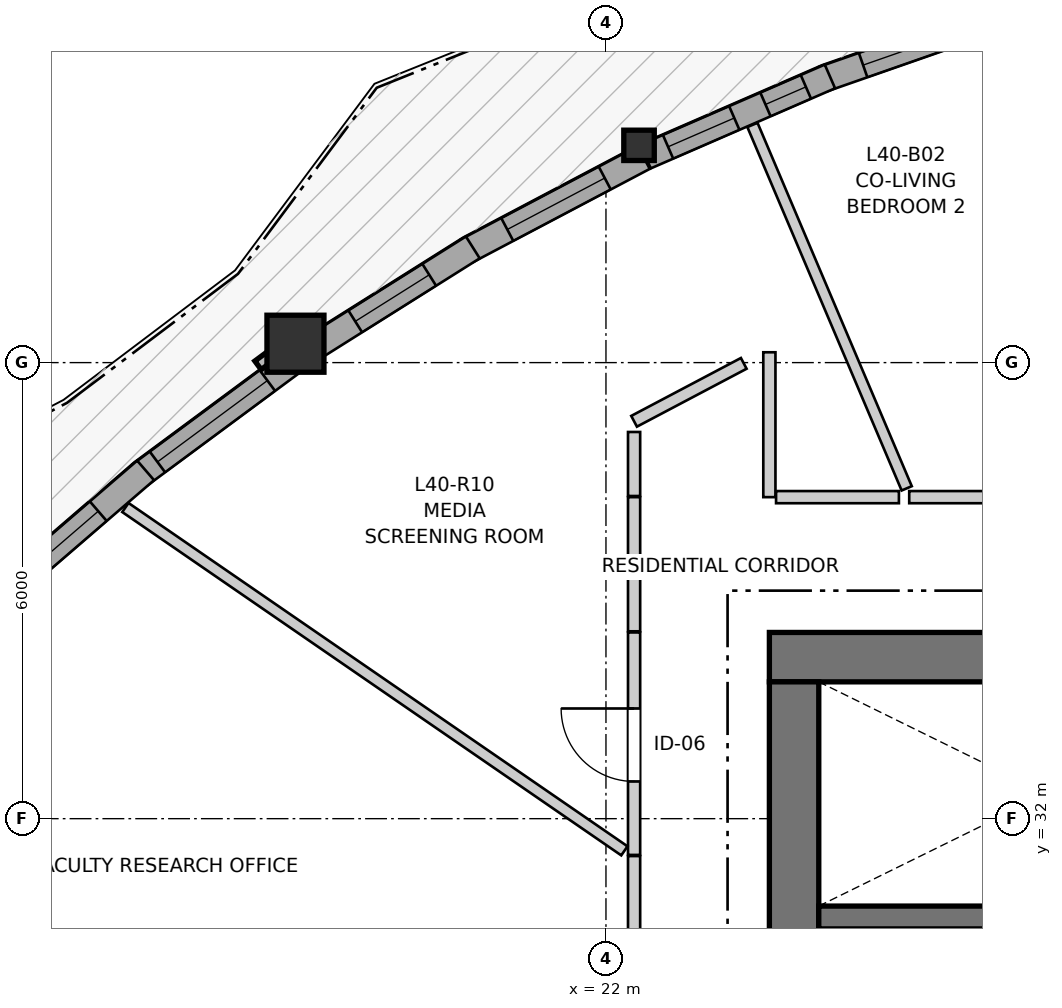
"""IFC4 building model, lengths in metres.
Left out: names, types, materials, properties, quantities, classifications, styles, units other than length and angle.
Written with IfcOpenShell. Run it as: python <this file> out.ifc"""

import sys

from ifc_helpers import new_model, si_unit, direction, frame, frame_2d, origin, origin_2d, place, context, subcontext, project, spatial, rectangle, i_section, extrude, source, transform, mapped, element, fill, save


model = new_model("IFC4")
c1 = context("Model", 3, precision=1e-05, world=origin(), true_north=direction((0.0, 1.0)))
c2 = subcontext(c1, "Body", "Model", "MODEL_VIEW")
j1 = project(units=[si_unit("LENGTHUNIT", "METRE"), si_unit("PLANEANGLEUNIT", "RADIAN")], contexts=[c1])
p1 = place(None, origin())
s1 = spatial("IfcSite", under=j1, at=p1, CompositionType="ELEMENT")
p2 = place(p1, origin())
s2 = spatial("IfcBuilding", under=s1, at=p2, CompositionType="ELEMENT")
p3 = place(p2, frame((0.0, 0.0, 136.2)))
s3 = spatial("IfcBuildingStorey", under=s2, at=p3, CompositionType="ELEMENT", Elevation=136.2)
p4 = place(p3, frame((36.55, 34.125, 0.0), z_axis=(0.0, 0.0, 1.0), x_axis=(-1.0, 0.0, 0.0)))
e1 = element("IfcWall", 1, at=p4, inside=s3, PredefinedType="SHEAR", context=c2, shape_type="SweptSolid", body=[
    extrude(rectangle(XDim=12.4, YDim=0.65, at=frame_2d((6.2, 0.0))), origin(), (0.0, 0.0, 1.0), 2.95),
])
p5 = place(p3, frame((24.475, 33.8, 0.0), z_axis=(0.0, 0.0, 1.0), x_axis=(0.0, -1.0, 0.0)))
e2 = element("IfcWall", 2, at=p5, inside=s3, PredefinedType="SHEAR", context=c2, shape_type="SweptSolid", body=[
    extrude(rectangle(XDim=15.6, YDim=0.65, at=frame_2d((7.8, 0.0))), origin(), (0.0, 0.0, 1.0), 2.95),
])
p6 = place(p5, frame((7.05, 0.0, 0.0)))
e3 = element("IfcOpeningElement", 3, at=p6, cuts=e2, PredefinedType="OPENING", context=c2, shape_type="SweptSolid", body=[
    extrude(rectangle(XDim=1.5, YDim=2.15, at=frame_2d((0.75, 1.075))), frame((0.0, 0.335, 0.0), z_axis=(0.0, -1.0, 0.0), x_axis=(1.0, 0.0, 0.0)), (0.0, 0.0, 1.0), 0.67),
])
p7 = place(p5, frame((3.52, 0.0, 0.0)))
e4 = element("IfcOpeningElement", 4, at=p7, cuts=e2, PredefinedType="OPENING", context=c2, shape_type="SweptSolid", body=[
    extrude(rectangle(XDim=0.86, YDim=2.05, at=frame_2d((0.43, 1.025))), frame((0.0, 0.335, 0.0), z_axis=(0.0, -1.0, 0.0), x_axis=(1.0, 0.0, 0.0)), (0.0, 0.0, 1.0), 0.67),
])
p8 = place(p5, frame((11.22, 0.0, 0.0)))
e5 = element("IfcOpeningElement", 5, at=p8, cuts=e2, PredefinedType="OPENING", context=c2, shape_type="SweptSolid", body=[
    extrude(rectangle(XDim=0.86, YDim=2.05, at=frame_2d((0.43, 1.025))), frame((0.0, 0.335, 0.0), z_axis=(0.0, -1.0, 0.0), x_axis=(1.0, 0.0, 0.0)), (0.0, 0.0, 1.0), 0.67),
])
p9 = place(p3, frame((24.8, 30.7, 0.0), z_axis=(0.0, 0.0, 1.0), x_axis=(1.0, 0.0, 0.0)))
e6 = element("IfcWall", 6, at=p9, inside=s3, PredefinedType="SHEAR", context=c2, shape_type="SweptSolid", body=[
    extrude(rectangle(XDim=11.1, YDim=0.3, at=frame_2d((5.55, 0.0))), origin(), (0.0, 0.0, 1.0), 2.95),
])
p10 = place(p9, frame((6.22, 0.0, 0.0)))
e7 = element("IfcOpeningElement", 7, at=p10, cuts=e6, PredefinedType="OPENING", context=c2, shape_type="SweptSolid", body=[
    extrude(rectangle(XDim=0.98, YDim=2.15, at=frame_2d((0.49, 1.075))), frame((0.0, 0.16, 0.0), z_axis=(0.0, -1.0, 0.0), x_axis=(1.0, 0.0, 0.0)), (0.0, 0.0, 1.0), 0.32),
])
p11 = place(p9, frame((9.15, 0.0, 0.0)))
e8 = element("IfcOpeningElement", 8, at=p11, cuts=e6, PredefinedType="OPENING", context=c2, shape_type="SweptSolid", body=[
    extrude(rectangle(XDim=1.15, YDim=2.15, at=frame_2d((0.575, 1.075))), frame((0.0, 0.16, 0.0), z_axis=(0.0, -1.0, 0.0), x_axis=(1.0, 0.0, 0.0)), (0.0, 0.0, 1.0), 0.32),
])
m1 = source(origin(), c2, "Body", "SweptSolid", [
    extrude(i_section(OverallWidth=0.401, OverallDepth=0.399, WebThickness=0.023, FlangeThickness=0.036, FilletRadius=0.015, at=origin_2d()), origin(), (0.0, 0.0, 1.0), 2.95),
])
p12 = place(p3, frame((22.435, 40.858, 0.0), z_axis=(0.0, 0.0, 1.0), x_axis=(1.0, 0.0, 0.0)))
e9 = element("IfcColumn", 9, at=p12, inside=s3, PredefinedType="PILASTER", context=c2, shape_type="MappedRepresentation", body=[
    mapped(m1, transform((0.0, 0.0, 0.0), x_axis=(1.0, 0.0, 0.0), y_axis=(0.0, 1.0, 0.0), z_axis=(0.0, 0.0, 1.0), scale=1.0)),
])
m2 = source(origin(), c2, "Body", "SweptSolid", [
    extrude(rectangle(XDim=0.75, YDim=0.75, at=origin_2d()), origin(), (0.0, 0.0, 1.0), 2.95),
])
p13 = place(p3, frame((17.915, 38.249, 0.0), z_axis=(0.0, 0.0, 1.0), x_axis=(1.0, 0.0, 0.0)))
e10 = element("IfcColumn", 10, at=p13, inside=s3, PredefinedType="COLUMN", context=c2, shape_type="MappedRepresentation", body=[
    mapped(m2, transform((0.0, 0.0, 0.0), x_axis=(1.0, 0.0, 0.0), y_axis=(0.0, 1.0, 0.0), z_axis=(0.0, 0.0, 1.0), scale=1.0)),
])
p14 = place(p3, frame((27.262, 42.57, 0.0), z_axis=(0.0, 0.0, 1.0), x_axis=(-0.944148723561, -0.329519631884, 0.0)))
e11 = element("IfcWall", 11, at=p14, inside=s3, PredefinedType="SOLIDWALL", context=c2, shape_type="SweptSolid", body=[
    extrude(rectangle(XDim=2.54, YDim=0.34, at=frame_2d((1.27, 0.0))), origin(), (0.0, 0.0, 1.0), 2.53),
])
p15 = place(p14, frame((0.54, 0.0, 0.82)))
e12 = element("IfcOpeningElement", 12, at=p15, cuts=e11, PredefinedType="OPENING", context=c2, shape_type="SweptSolid", body=[
    extrude(rectangle(XDim=1.45, YDim=1.25, at=frame_2d((0.725, 0.625))), frame((0.0, 0.18, 0.0), z_axis=(0.0, -1.0, 0.0), x_axis=(1.0, 0.0, 0.0)), (0.0, 0.0, 1.0), 0.36),
])
p16 = place(p3, frame((24.947, 41.765, 0.0), z_axis=(0.0, 0.0, 1.0), x_axis=(-0.917074459221, -0.398715984435, 0.0)))
e13 = element("IfcWall", 13, at=p16, inside=s3, PredefinedType="SOLIDWALL", context=c2, shape_type="SweptSolid", body=[
    extrude(rectangle(XDim=2.645, YDim=0.34, at=frame_2d((1.322, 0.0))), origin(), (0.0, 0.0, 1.0), 2.53),
])
p17 = place(p16, frame((0.344, 0.0, 0.82)))
e14 = element("IfcOpeningElement", 14, at=p17, cuts=e13, PredefinedType="OPENING", context=c2, shape_type="SweptSolid", body=[
    extrude(rectangle(XDim=0.58, YDim=1.35, at=frame_2d((0.29, 0.675))), frame((0.0, 0.18, 0.0), z_axis=(0.0, -1.0, 0.0), x_axis=(1.0, 0.0, 0.0)), (0.0, 0.0, 1.0), 0.36),
])
p18 = place(p16, frame((1.372, 0.0, 0.82)))
e15 = element("IfcOpeningElement", 15, at=p18, cuts=e13, PredefinedType="OPENING", context=c2, shape_type="SweptSolid", body=[
    extrude(rectangle(XDim=0.95, YDim=1.35, at=frame_2d((0.475, 0.675))), frame((0.0, 0.18, 0.0), z_axis=(0.0, -1.0, 0.0), x_axis=(1.0, 0.0, 0.0)), (0.0, 0.0, 1.0), 0.36),
])
p19 = place(p3, frame((22.497, 40.699, 0.0), z_axis=(0.0, 0.0, 1.0), x_axis=(-0.88439007496, -0.466748535415, 0.0)))
e16 = element("IfcWall", 16, at=p19, inside=s3, PredefinedType="SOLIDWALL", context=c2, shape_type="SweptSolid", body=[
    extrude(rectangle(XDim=2.63, YDim=0.34, at=frame_2d((1.315, 0.0))), origin(), (0.0, 0.0, 1.0), 2.53),
])
p20 = place(p19, frame((0.58, 0.0, 0.82)))
e17 = element("IfcOpeningElement", 17, at=p20, cuts=e16, PredefinedType="OPENING", context=c2, shape_type="SweptSolid", body=[
    extrude(rectangle(XDim=1.45, YDim=1.25, at=frame_2d((0.725, 0.625))), frame((0.0, 0.18, 0.0), z_axis=(0.0, -1.0, 0.0), x_axis=(1.0, 0.0, 0.0)), (0.0, 0.0, 1.0), 0.36),
])
p21 = place(p3, frame((20.248, 39.516, 0.0), z_axis=(0.0, 0.0, 1.0), x_axis=(-0.846438698205, -0.532486178394, 0.0)))
e18 = element("IfcWall", 18, at=p21, inside=s3, PredefinedType="SOLIDWALL", context=c2, shape_type="SweptSolid", body=[
    extrude(rectangle(XDim=2.495, YDim=0.34, at=frame_2d((1.247, 0.0))), origin(), (0.0, 0.0, 1.0), 2.53),
])
p22 = place(p21, frame((0.677, 0.0, 0.82)))
e19 = element("IfcOpeningElement", 19, at=p22, cuts=e18, PredefinedType="OPENING", context=c2, shape_type="SweptSolid", body=[
    extrude(rectangle(XDim=1.15, YDim=1.2, at=frame_2d((0.575, 0.6))), frame((0.0, 0.18, 0.0), z_axis=(0.0, -1.0, 0.0), x_axis=(1.0, 0.0, 0.0)), (0.0, 0.0, 1.0), 0.36),
])
p23 = place(p3, frame((17.891, 38.02, 0.0), z_axis=(0.0, 0.0, 1.0), x_axis=(-0.803824223013, -0.594866891411, 0.0)))
e20 = element("IfcWall", 20, at=p23, inside=s3, PredefinedType="SOLIDWALL", context=c2, shape_type="SweptSolid", body=[
    extrude(rectangle(XDim=2.51, YDim=0.34, at=frame_2d((1.255, 0.0))), origin(), (0.0, 0.0, 1.0), 2.53),
])
p24 = place(p23, frame((0.43, 0.0, 0.82)))
e21 = element("IfcOpeningElement", 21, at=p24, cuts=e20, PredefinedType="OPENING", context=c2, shape_type="SweptSolid", body=[
    extrude(rectangle(XDim=1.8, YDim=1.45, at=frame_2d((0.9, 0.725))), frame((0.0, 0.18, 0.0), z_axis=(0.0, -1.0, 0.0), x_axis=(1.0, 0.0, 0.0)), (0.0, 0.0, 1.0), 0.36),
])
p25 = place(p3, frame((15.943, 36.582, 0.0), z_axis=(0.0, 0.0, 1.0), x_axis=(-0.757520482063, -0.652811396389, 0.0)))
e22 = element("IfcWall", 22, at=p25, inside=s3, PredefinedType="SOLIDWALL", context=c2, shape_type="SweptSolid", body=[
    extrude(rectangle(XDim=2.674, YDim=0.34, at=frame_2d((1.337, 0.0))), origin(), (0.0, 0.0, 1.0), 2.53),
])
p26 = place(p25, frame((0.822, 0.0, 0.82)))
e23 = element("IfcOpeningElement", 23, at=p26, cuts=e22, PredefinedType="OPENING", context=c2, shape_type="SweptSolid", body=[
    extrude(rectangle(XDim=1.5, YDim=1.45, at=frame_2d((0.75, 0.725))), frame((0.0, 0.18, 0.0), z_axis=(0.0, -1.0, 0.0), x_axis=(1.0, 0.0, 0.0)), (0.0, 0.0, 1.0), 0.36),
])
p27 = place(p3, frame((25.99, 36.23, 0.0), z_axis=(0.0, 0.0, 1.0), x_axis=(1.0, 0.0, 0.0)))
e24 = element("IfcWall", 24, at=p27, inside=s3, PredefinedType="PARTITIONING", context=c2, shape_type="SweptSolid", body=[
    extrude(rectangle(XDim=4.073, YDim=0.16, at=frame_2d((2.037, 0.0))), origin(), (0.0, 0.0, 1.0), 2.95),
])
p28 = place(p27, frame((1.6, 0.0, 0.0)))
e25 = element("IfcOpeningElement", 25, at=p28, cuts=e24, PredefinedType="OPENING", context=c2, shape_type="SweptSolid", body=[
    extrude(rectangle(XDim=0.92, YDim=2.1, at=frame_2d((0.46, 1.05))), frame((0.0, 0.09, 0.0), z_axis=(0.0, -1.0, 0.0), x_axis=(1.0, 0.0, 0.0)), (0.0, 0.0, 1.0), 0.18),
])
p29 = place(p3, frame((22.37, 27.85, 0.0), z_axis=(0.0, 0.0, 1.0), x_axis=(0.0, 1.0, 0.0)))
e26 = element("IfcWall", 26, at=p29, inside=s3, PredefinedType="PARTITIONING", context=c2, shape_type="SweptSolid", body=[
    extrude(rectangle(XDim=3.658, YDim=0.16, at=frame_2d((1.829, 0.0))), origin(), (0.0, 0.0, 1.0), 2.95),
])
p30 = place(p29, frame((1.369, 0.0, 0.0)))
e27 = element("IfcOpeningElement", 27, at=p30, cuts=e26, PredefinedType="OPENING", context=c2, shape_type="SweptSolid", body=[
    extrude(rectangle(XDim=0.96, YDim=2.1, at=frame_2d((0.48, 1.05))), frame((0.0, 0.09, 0.0), z_axis=(0.0, -1.0, 0.0), x_axis=(1.0, 0.0, 0.0)), (0.0, 0.0, 1.0), 0.18),
])
p31 = place(p3, frame((22.37, 31.523, 0.0), z_axis=(0.0, 0.0, 1.0), x_axis=(0.0, 1.0, 0.0)))
e28 = element("IfcWall", 28, at=p31, inside=s3, PredefinedType="PARTITIONING", context=c2, shape_type="SweptSolid", body=[
    extrude(rectangle(XDim=2.927, YDim=0.16, at=frame_2d((1.463, 0.0))), origin(), (0.0, 0.0, 1.0), 2.95),
])
p32 = place(p31, frame((0.967, 0.0, 0.0)))
e29 = element("IfcOpeningElement", 29, at=p32, cuts=e28, PredefinedType="OPENING", context=c2, shape_type="SweptSolid", body=[
    extrude(rectangle(XDim=0.96, YDim=2.1, at=frame_2d((0.48, 1.05))), frame((0.0, 0.09, 0.0), z_axis=(0.0, -1.0, 0.0), x_axis=(1.0, 0.0, 0.0)), (0.0, 0.0, 1.0), 0.18),
])
p33 = place(p3, frame((15.677, 36.094, 0.0), z_axis=(0.0, 0.0, 1.0), x_axis=(0.823863992983, -0.566787544911, 0.0)))
e30 = element("IfcWall", 30, at=p33, inside=s3, PredefinedType="PARTITIONING", context=c2, shape_type="SweptSolid", body=[
    extrude(rectangle(XDim=7.969, YDim=0.145, at=frame_2d((3.984, 0.0))), origin(), (0.0, 0.0, 1.0), 2.95),
])
p34 = place(p3, frame((23.927, 41.127, 0.0), z_axis=(0.0, 0.0, 1.0), x_axis=(0.39073452171, -0.920503413108, 0.0)))
e31 = element("IfcWall", 31, at=p34, inside=s3, PredefinedType="PARTITIONING", context=c2, shape_type="SweptSolid", body=[
    extrude(rectangle(XDim=5.194, YDim=0.145, at=frame_2d((2.597, 0.0))), origin(), (0.0, 0.0, 1.0), 2.95),
])
p35 = place(p3, frame((24.15, 36.23, 0.0), z_axis=(0.0, 0.0, 1.0), x_axis=(0.0, 1.0, 0.0)))
e32 = element("IfcWall", 32, at=p35, inside=s3, PredefinedType="PARTITIONING", context=c2, shape_type="SweptSolid", body=[
    extrude(rectangle(XDim=1.906, YDim=0.16, at=frame_2d((0.953, 0.0))), origin(), (0.0, 0.0, 1.0), 2.95),
])
p36 = place(p3, frame((24.238, 36.23, 0.0), z_axis=(0.0, 0.0, 1.0), x_axis=(1.0, 0.0, 0.0)))
e33 = element("IfcWall", 33, at=p36, inside=s3, PredefinedType="PARTITIONING", context=c2, shape_type="SweptSolid", body=[
    extrude(rectangle(XDim=1.616, YDim=0.16, at=frame_2d((0.808, 0.0))), origin(), (0.0, 0.0, 1.0), 2.95),
])
p37 = place(p3, frame((22.37, 34.465, 0.0), z_axis=(0.0, 0.0, 1.0), x_axis=(0.0, 1.0, 0.0)))
e34 = element("IfcWall", 34, at=p37, inside=s3, PredefinedType="PARTITIONING", context=c2, shape_type="SweptSolid", body=[
    extrude(rectangle(XDim=1.765, YDim=0.16, at=frame_2d((0.882, 0.0))), origin(), (0.0, 0.0, 1.0), 2.95),
])
p38 = place(p3, frame((22.37, 37.228, 0.0), z_axis=(0.0, 0.0, 1.0), x_axis=(0.884271493782, 0.466973152638, 0.0)))
e35 = element("IfcWall", 35, at=p38, inside=s3, PredefinedType="PARTITIONING", context=c2, shape_type="SweptSolid", body=[
    extrude(rectangle(XDim=1.632, YDim=0.16, at=frame_2d((0.816, 0.0))), origin(), (0.0, 0.0, 1.0), 2.558),
])
p39 = place(p3, frame((22.37, 36.245, 0.0), z_axis=(0.0, 0.0, 1.0), x_axis=(0.0, 1.0, 0.0)))
e36 = element("IfcWall", 36, at=p39, inside=s3, PredefinedType="PARTITIONING", context=c2, shape_type="SweptSolid", body=[
    extrude(rectangle(XDim=0.842, YDim=0.16, at=frame_2d((0.421, 0.0))), origin(), (0.0, 0.0, 1.0), 2.95),
])
m3 = source(origin(), c2, "Body", "SweptSolid", [
    extrude(rectangle(XDim=1.45, YDim=1.25, at=frame_2d((0.725, 0.625))), frame((0.0, 0.03, 0.0), z_axis=(0.0, -1.0, 0.0), x_axis=(1.0, 0.0, 0.0)), (0.0, 0.0, 1.0), 0.06),
])
p40 = place(p15, origin())
e37 = element("IfcWindow", 37, at=p40, inside=s3, PartitioningType="SINGLE_PANEL", PredefinedType="WINDOW", context=c2, shape_type="MappedRepresentation", body=[
    mapped(m3, transform((0.0, 0.0, 0.0), x_axis=(1.0, 0.0, 0.0), y_axis=(0.0, 1.0, 0.0), z_axis=(0.0, 0.0, 1.0), scale=1.0)),
])
fill(e12, e37)
m4 = source(origin(), c2, "Body", "SweptSolid", [
    extrude(rectangle(XDim=0.58, YDim=1.35, at=frame_2d((0.29, 0.675))), frame((0.0, 0.03, 0.0), z_axis=(0.0, -1.0, 0.0), x_axis=(1.0, 0.0, 0.0)), (0.0, 0.0, 1.0), 0.06),
])
p41 = place(p17, origin())
e38 = element("IfcWindow", 38, at=p41, inside=s3, PartitioningType="SINGLE_PANEL", PredefinedType="WINDOW", context=c2, shape_type="MappedRepresentation", body=[
    mapped(m4, transform((0.0, 0.0, 0.0), x_axis=(1.0, 0.0, 0.0), y_axis=(0.0, 1.0, 0.0), z_axis=(0.0, 0.0, 1.0), scale=1.0)),
])
fill(e14, e38)
m5 = source(origin(), c2, "Body", "SweptSolid", [
    extrude(rectangle(XDim=0.95, YDim=1.35, at=frame_2d((0.475, 0.675))), frame((0.0, 0.03, 0.0), z_axis=(0.0, -1.0, 0.0), x_axis=(1.0, 0.0, 0.0)), (0.0, 0.0, 1.0), 0.06),
])
p42 = place(p18, origin())
e39 = element("IfcWindow", 39, at=p42, inside=s3, PartitioningType="SINGLE_PANEL", PredefinedType="WINDOW", context=c2, shape_type="MappedRepresentation", body=[
    mapped(m5, transform((0.0, 0.0, 0.0), x_axis=(1.0, 0.0, 0.0), y_axis=(0.0, 1.0, 0.0), z_axis=(0.0, 0.0, 1.0), scale=1.0)),
])
fill(e15, e39)
p43 = place(p20, origin())
e40 = element("IfcWindow", 40, at=p43, inside=s3, PartitioningType="SINGLE_PANEL", PredefinedType="WINDOW", context=c2, shape_type="MappedRepresentation", body=[
    mapped(m3, transform((0.0, 0.0, 0.0), x_axis=(1.0, 0.0, 0.0), y_axis=(0.0, 1.0, 0.0), z_axis=(0.0, 0.0, 1.0), scale=1.0)),
])
fill(e17, e40)
m6 = source(origin(), c2, "Body", "SweptSolid", [
    extrude(rectangle(XDim=1.15, YDim=1.2, at=frame_2d((0.575, 0.6))), frame((0.0, 0.03, 0.0), z_axis=(0.0, -1.0, 0.0), x_axis=(1.0, 0.0, 0.0)), (0.0, 0.0, 1.0), 0.06),
])
p44 = place(p22, origin())
e41 = element("IfcWindow", 41, at=p44, inside=s3, PartitioningType="SINGLE_PANEL", PredefinedType="WINDOW", context=c2, shape_type="MappedRepresentation", body=[
    mapped(m6, transform((0.0, 0.0, 0.0), x_axis=(1.0, 0.0, 0.0), y_axis=(0.0, 1.0, 0.0), z_axis=(0.0, 0.0, 1.0), scale=1.0)),
])
fill(e19, e41)
m7 = source(origin(), c2, "Body", "SweptSolid", [
    extrude(rectangle(XDim=1.8, YDim=1.45, at=frame_2d((0.9, 0.725))), frame((0.0, 0.03, 0.0), z_axis=(0.0, -1.0, 0.0), x_axis=(1.0, 0.0, 0.0)), (0.0, 0.0, 1.0), 0.06),
])
p45 = place(p24, origin())
e42 = element("IfcWindow", 42, at=p45, inside=s3, PartitioningType="SINGLE_PANEL", PredefinedType="WINDOW", context=c2, shape_type="MappedRepresentation", body=[
    mapped(m7, transform((0.0, 0.0, 0.0), x_axis=(1.0, 0.0, 0.0), y_axis=(0.0, 1.0, 0.0), z_axis=(0.0, 0.0, 1.0), scale=1.0)),
])
fill(e21, e42)
m8 = source(origin(), c2, "Body", "SweptSolid", [
    extrude(rectangle(XDim=1.5, YDim=1.45, at=frame_2d((0.75, 0.725))), frame((0.0, 0.03, 0.0), z_axis=(0.0, -1.0, 0.0), x_axis=(1.0, 0.0, 0.0)), (0.0, 0.0, 1.0), 0.06),
])
p46 = place(p26, origin())
e43 = element("IfcWindow", 43, at=p46, inside=s3, PartitioningType="SINGLE_PANEL", PredefinedType="WINDOW", context=c2, shape_type="MappedRepresentation", body=[
    mapped(m8, transform((0.0, 0.0, 0.0), x_axis=(1.0, 0.0, 0.0), y_axis=(0.0, 1.0, 0.0), z_axis=(0.0, 0.0, 1.0), scale=1.0)),
])
fill(e23, e43)
m9 = source(origin(), c2, "Body", "SweptSolid", [
    extrude(rectangle(XDim=0.96, YDim=2.1, at=frame_2d((0.48, 1.05))), frame((0.0, 0.025, 0.0), z_axis=(0.0, -1.0, 0.0), x_axis=(1.0, 0.0, 0.0)), (0.0, 0.0, 1.0), 0.05),
])
p47 = place(p32, origin())
e44 = element("IfcDoor", 44, at=p47, inside=s3, OperationType="SINGLE_SWING_RIGHT", PredefinedType="DOOR", context=c2, shape_type="MappedRepresentation", body=[
    mapped(m9, transform((0.0, 0.0, 0.0), x_axis=(1.0, 0.0, 0.0), y_axis=(0.0, 1.0, 0.0), z_axis=(0.0, 0.0, 1.0), scale=1.0)),
])
fill(e29, e44)
save(model, sys.argv[1])
